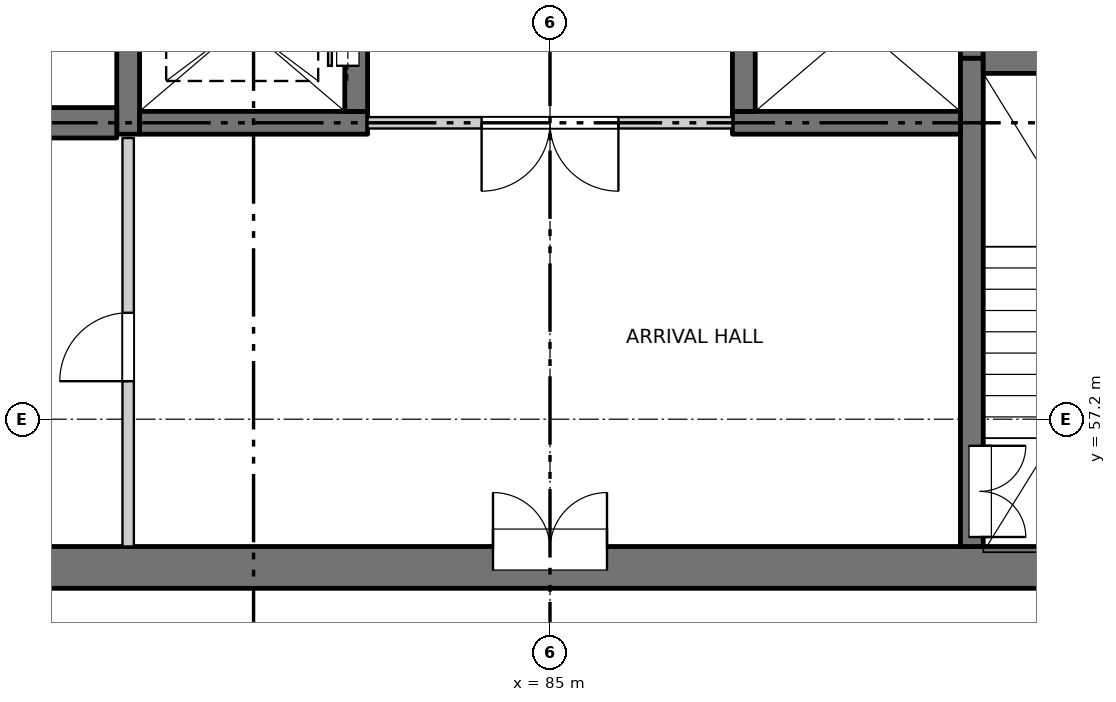
"""IFC4 building model, lengths in metres.
Left out: names, types, materials, properties, quantities, classifications, styles, units other than length and angle.
Written with IfcOpenShell. Run it as: python <this file> out.ifc"""

import sys

from ifc_helpers import new_model, si_unit, direction, frame, frame_2d, origin, place, context, subcontext, project, spatial, rectangle, extrude, element, fill, save


model = new_model("IFC4")
c1 = context("Model", 3, precision=1e-05, world=origin(), true_north=direction((0.0, 1.0)))
c2 = subcontext(c1, "Body", "Model", "MODEL_VIEW")
j1 = project(units=[si_unit("LENGTHUNIT", "METRE"), si_unit("PLANEANGLEUNIT", "RADIAN")], contexts=[c1])
p1 = place(None, origin())
s1 = spatial("IfcSite", under=j1, at=p1, CompositionType="ELEMENT")
p2 = place(p1, origin())
s2 = spatial("IfcBuilding", under=s1, at=p2, CompositionType="ELEMENT")
p3 = place(p2, frame((0.0, 0.0, 113.5)))
s3 = spatial("IfcBuildingStorey", under=s2, at=p3, CompositionType="ELEMENT", Elevation=113.5)
p4 = place(p3, frame((75.525, 55.25, -0.25), z_axis=(0.0, 0.0, 1.0), x_axis=(1.0, 0.0, 0.0)))
e1 = element("IfcWall", 1, at=p4, inside=s3, PredefinedType="SOLIDWALL", context=c2, shape_type="SweptSolid", body=[
    extrude(rectangle(XDim=18.95, YDim=0.55, at=frame_2d((9.475, 0.0))), origin(), (0.0, 0.0, 1.0), 3.35),
])
p5 = place(p4, frame((8.725, 0.0, 0.25)))
e2 = element("IfcOpeningElement", 2, at=p5, cuts=e1, PredefinedType="OPENING", context=c2, shape_type="SweptSolid", body=[
    extrude(rectangle(XDim=1.5, YDim=2.1, at=frame_2d((0.75, 1.05))), frame((0.0, 0.285, 0.0), z_axis=(0.0, -1.0, 0.0), x_axis=(1.0, 0.0, 0.0)), (0.0, 0.0, 1.0), 0.57),
])
p6 = place(p3, frame((79.45, 60.95, -0.25), z_axis=(0.0, 0.0, 1.0), x_axis=(0.0, 1.0, 0.0)))
e3 = element("IfcWall", 3, at=p6, inside=s3, PredefinedType="SOLIDWALL", context=c2, shape_type="SweptSolid", body=[
    extrude(rectangle(XDim=16.35, YDim=0.3, at=frame_2d((8.175, 0.0))), origin(), (0.0, 0.0, 1.0), 3.35),
])
p7 = place(p3, frame((90.55, 55.525, -0.25), z_axis=(0.0, 0.0, 1.0), x_axis=(0.0, 1.0, 0.0)))
e4 = element("IfcWall", 4, at=p7, inside=s3, PredefinedType="SOLIDWALL", context=c2, shape_type="SweptSolid", body=[
    extrude(rectangle(XDim=6.425, YDim=0.3, at=frame_2d((3.212, 0.0))), origin(), (0.0, 0.0, 1.0), 3.35),
])
p8 = place(p7, frame((0.125, 0.0, 0.25)))
e5 = element("IfcOpeningElement", 5, at=p8, cuts=e4, PredefinedType="OPENING", context=c2, shape_type="SweptSolid", body=[
    extrude(rectangle(XDim=1.2, YDim=2.1, at=frame_2d((0.6, 1.05))), frame((0.0, 0.16, 0.0), z_axis=(0.0, -1.0, 0.0), x_axis=(1.0, 0.0, 0.0)), (0.0, 0.0, 1.0), 0.32),
])
p9 = place(p3, frame((90.55, 61.95, -0.25), z_axis=(0.0, 0.0, 1.0), x_axis=(0.0, 1.0, 0.0)))
e6 = element("IfcWall", 6, at=p9, inside=s3, PredefinedType="SOLIDWALL", context=c2, shape_type="SweptSolid", body=[
    extrude(rectangle(XDim=15.35, YDim=0.3, at=frame_2d((7.675, 0.0))), origin(), (0.0, 0.0, 1.0), 3.35),
])
p10 = place(p3, frame((79.6, 61.1, -0.25), z_axis=(0.0, 0.0, 1.0), x_axis=(1.0, 0.0, 0.0)))
e7 = element("IfcWall", 7, at=p10, inside=s3, PredefinedType="SOLIDWALL", context=c2, shape_type="SweptSolid", body=[
    extrude(rectangle(XDim=3.0, YDim=0.3, at=frame_2d((1.5, 0.0))), origin(), (0.0, 0.0, 1.0), 3.35),
])
p11 = place(p3, frame((82.45, 61.25, -0.25), z_axis=(0.0, 0.0, 1.0), x_axis=(0.0, 1.0, 0.0)))
e8 = element("IfcWall", 8, at=p11, inside=s3, PredefinedType="SOLIDWALL", context=c2, shape_type="SweptSolid", body=[
    extrude(rectangle(XDim=2.3, YDim=0.3, at=frame_2d((1.15, 0.0))), origin(), (0.0, 0.0, 1.0), 3.35),
])
p12 = place(p11, frame((0.6, 0.0, 0.25)))
e9 = element("IfcOpeningElement", 9, at=p12, cuts=e8, PredefinedType="OPENING", context=c2, shape_type="SweptSolid", body=[
    extrude(rectangle(XDim=1.1, YDim=2.1, at=frame_2d((0.55, 1.05))), frame((0.0, 0.16, 0.0), z_axis=(0.0, -1.0, 0.0), x_axis=(1.0, 0.0, 0.0)), (0.0, 0.0, 1.0), 0.32),
])
p13 = place(p3, frame((87.4, 61.1, -0.25), z_axis=(0.0, 0.0, 1.0), x_axis=(1.0, 0.0, 0.0)))
e10 = element("IfcWall", 10, at=p13, inside=s3, PredefinedType="SOLIDWALL", context=c2, shape_type="SweptSolid", body=[
    extrude(rectangle(XDim=3.0, YDim=0.3, at=frame_2d((1.5, 0.0))), origin(), (0.0, 0.0, 1.0), 3.35),
])
p14 = place(p3, frame((87.55, 61.25, -0.25), z_axis=(0.0, 0.0, 1.0), x_axis=(0.0, 1.0, 0.0)))
e11 = element("IfcWall", 11, at=p14, inside=s3, PredefinedType="SOLIDWALL", context=c2, shape_type="SweptSolid", body=[
    extrude(rectangle(XDim=2.3, YDim=0.3, at=frame_2d((1.15, 0.0))), origin(), (0.0, 0.0, 1.0), 3.35),
])
for number, where, z_axis, x_axis in (
    (12, (75.525, 61.1, -0.25), (0.0, 0.0, 1.0), (1.0, 0.0, 0.0)),
    (13, (90.7, 61.95, -0.25), (0.0, 0.0, 1.0), (1.0, 0.0, 0.0)),
):
    element("IfcWall", number, at=place(p3, frame(where, z_axis=z_axis, x_axis=x_axis)), inside=s3, PredefinedType="SOLIDWALL", context=c2, shape_type="SweptSolid", body=[
        extrude(rectangle(XDim=3.775, YDim=0.4, at=frame_2d((1.888, 0.0))), origin(), (0.0, 0.0, 1.0), 3.35),
    ])
p15 = place(p3, frame((82.6, 61.1, 0.0), z_axis=(0.0, 0.0, 1.0), x_axis=(1.0, 0.0, 0.0)))
e14 = element("IfcWall", 14, at=p15, inside=s3, PredefinedType="PARTITIONING", context=c2, shape_type="SweptSolid", body=[
    extrude(rectangle(XDim=4.8, YDim=0.15, at=frame_2d((2.4, 0.0))), origin(), (0.0, 0.0, 1.0), 3.1),
])
p16 = place(p15, frame((1.5, 0.0, 0.0)))
e15 = element("IfcOpeningElement", 15, at=p16, cuts=e14, PredefinedType="OPENING", context=c2, shape_type="SweptSolid", body=[
    extrude(rectangle(XDim=1.8, YDim=2.1, at=frame_2d((0.9, 1.05))), frame((0.0, 0.085, 0.0), z_axis=(0.0, -1.0, 0.0), x_axis=(1.0, 0.0, 0.0)), (0.0, 0.0, 1.0), 0.17),
])
p17 = place(p3, frame((79.45, 55.525, 0.0), z_axis=(0.0, 0.0, 1.0), x_axis=(0.0, 1.0, 0.0)))
e16 = element("IfcWall", 16, at=p17, inside=s3, PredefinedType="PARTITIONING", context=c2, shape_type="SweptSolid", body=[
    extrude(rectangle(XDim=5.375, YDim=0.15, at=frame_2d((2.688, 0.0))), origin(), (0.0, 0.0, 1.0), 3.1),
])
p18 = place(p17, frame((2.175, 0.0, 0.0)))
e17 = element("IfcOpeningElement", 17, at=p18, cuts=e16, PredefinedType="OPENING", context=c2, shape_type="SweptSolid", body=[
    extrude(rectangle(XDim=0.9, YDim=2.1, at=frame_2d((0.45, 1.05))), frame((0.0, 0.085, 0.0), z_axis=(0.0, -1.0, 0.0), x_axis=(1.0, 0.0, 0.0)), (0.0, 0.0, 1.0), 0.17),
])
p19 = place(p5, origin())
e18 = element("IfcDoor", 18, at=p19, inside=s3, OperationType="DOUBLE_DOOR_SINGLE_SWING", PredefinedType="DOOR", context=c2, shape_type="SweptSolid", body=[
    extrude(rectangle(XDim=1.5, YDim=2.1, at=frame_2d((0.75, 1.05))), frame((0.0, 0.26, 0.0), z_axis=(0.0, -1.0, 0.0), x_axis=(1.0, 0.0, 0.0)), (0.0, 0.0, 1.0), 0.05),
])
fill(e2, e18)
p20 = place(p8, origin())
e19 = element("IfcDoor", 19, at=p20, inside=s3, OperationType="DOUBLE_DOOR_SINGLE_SWING", PredefinedType="DOOR", context=c2, shape_type="SweptSolid", body=[
    extrude(rectangle(XDim=1.2, YDim=2.1, at=frame_2d((0.6, 1.05))), frame((0.0, -0.085, 0.0), z_axis=(0.0, -1.0, 0.0), x_axis=(1.0, 0.0, 0.0)), (0.0, 0.0, 1.0), 0.05),
])
fill(e5, e19)
p21 = place(p18, origin())
e20 = element("IfcDoor", 20, at=p21, inside=s3, OperationType="SINGLE_SWING_LEFT", PredefinedType="DOOR", context=c2, shape_type="SweptSolid", body=[
    extrude(rectangle(XDim=0.9, YDim=2.1, at=frame_2d((0.45, 1.05))), frame((0.0, 0.025, 0.0), z_axis=(0.0, -1.0, 0.0), x_axis=(1.0, 0.0, 0.0)), (0.0, 0.0, 1.0), 0.05),
])
fill(e17, e20)
p22 = place(p16, origin())
e21 = element("IfcDoor", 21, at=p22, inside=s3, OperationType="DOUBLE_DOOR_SINGLE_SWING", PredefinedType="DOOR", context=c2, shape_type="SweptSolid", body=[
    extrude(rectangle(XDim=1.8, YDim=2.1, at=frame_2d((0.9, 1.05))), frame((0.0, 0.025, 0.0), z_axis=(0.0, -1.0, 0.0), x_axis=(1.0, 0.0, 0.0)), (0.0, 0.0, 1.0), 0.05),
])
fill(e15, e21)
p23 = place(p12, origin())
e22 = element("IfcDoor", 22, at=p23, inside=s3, OperationType="SLIDING_TO_RIGHT", PredefinedType="DOOR", context=c2, shape_type="SweptSolid", body=[
    extrude(rectangle(XDim=1.1, YDim=2.1, at=frame_2d((0.55, 1.05))), frame((0.0, 0.135, 0.0), z_axis=(0.0, -1.0, 0.0), x_axis=(1.0, 0.0, 0.0)), (0.0, 0.0, 1.0), 0.05),
])
fill(e9, e22)
save(model, sys.argv[1])
